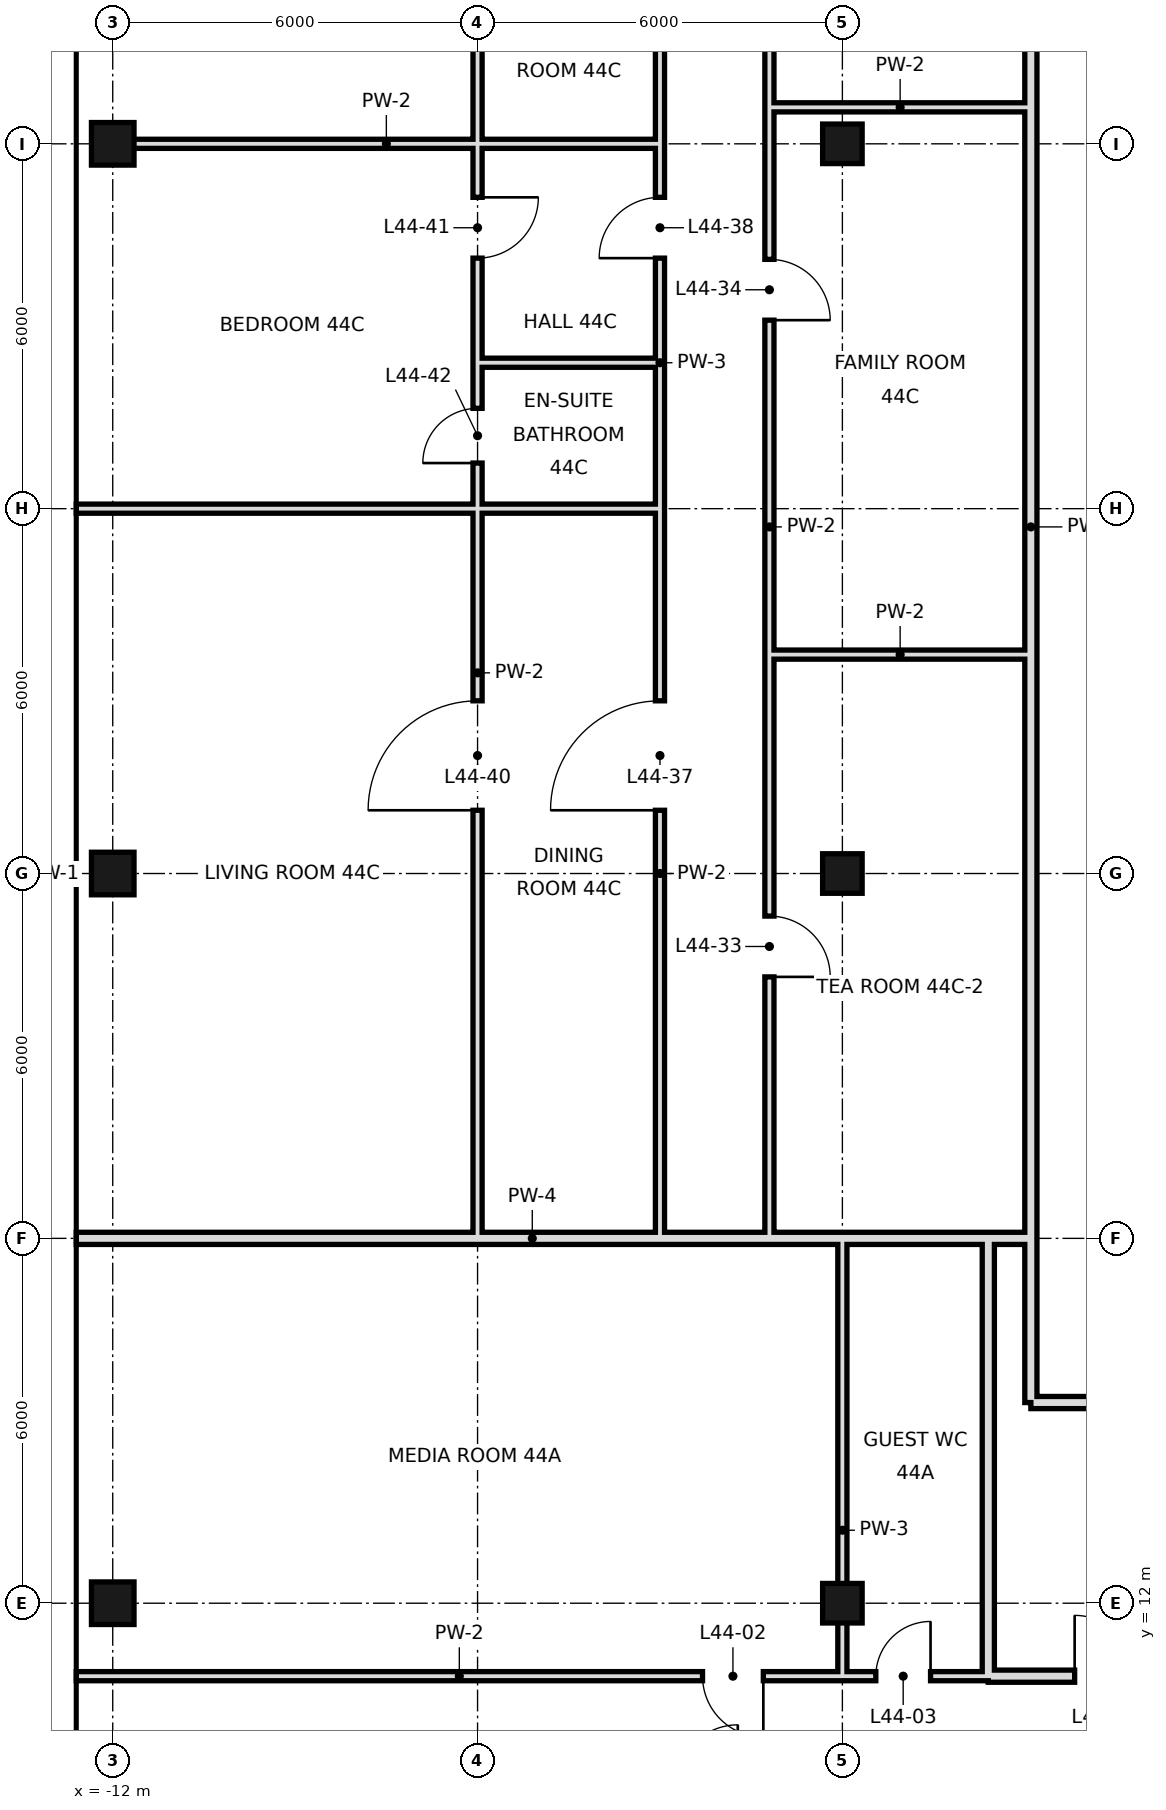
"""IFC4 building model, lengths in metres.
Left out: names, types, materials, properties, quantities, classifications, styles, units other than length and angle.
Written with IfcOpenShell. Run it as: python <this file> out.ifc"""

import sys

from ifc_helpers import new_model, si_unit, direction, frame, frame_2d, origin, origin_2d, place, context, subcontext, project, spatial, rectangle, hollow_rectangle, extrude, element, fill, save


model = new_model("IFC4")
c1 = context("Model", 3, precision=1e-05, world=origin(), true_north=direction((0.0, 1.0)))
c2 = subcontext(c1, "Body", "Model", "MODEL_VIEW")
j1 = project(units=[si_unit("LENGTHUNIT", "METRE"), si_unit("PLANEANGLEUNIT", "RADIAN")], contexts=[c1])
p1 = place(None, origin())
s1 = spatial("IfcSite", under=j1, at=p1, CompositionType="ELEMENT")
p2 = place(p1, origin())
s2 = spatial("IfcBuilding", under=s1, at=p2, CompositionType="ELEMENT")
p3 = place(p2, frame((0.0, 0.0, 192.0)))
s3 = spatial("IfcBuildingStorey", under=s2, at=p3, CompositionType="ELEMENT", Elevation=192.0)
for number, where, z_axis, x_axis in (
    (1, (-12.0, 12.0, -0.3), (0.0, 0.0, 1.0), (1.0, 0.0, 0.0)),
    (2, (-12.0, 24.0, -0.3), (0.0, 0.0, 1.0), (1.0, 0.0, 0.0)),
    (3, (-12.0, 36.0, -0.3), (0.0, 0.0, 1.0), (1.0, 0.0, 0.0)),
):
    element("IfcColumn", number, at=place(p3, frame(where, z_axis=z_axis, x_axis=x_axis)), inside=s3, PredefinedType="COLUMN", context=c2, shape_type="SweptSolid", body=[
        extrude(hollow_rectangle(XDim=0.7, YDim=0.7, WallThickness=0.036, at=origin_2d()), origin(), (0.0, 0.0, 1.0), 3.9),
    ])
for number, where, z_axis, x_axis in (
    (4, (0.0, 12.0, 0.0), (0.0, 0.0, 1.0), (1.0, 0.0, 0.0)),
    (5, (0.0, 24.0, 0.0), (0.0, 0.0, 1.0), (1.0, 0.0, 0.0)),
    (6, (0.0, 36.0, 0.0), (0.0, 0.0, 1.0), (1.0, 0.0, 0.0)),
):
    element("IfcColumn", number, at=place(p3, frame(where, z_axis=z_axis, x_axis=x_axis)), inside=s3, PredefinedType="COLUMN", context=c2, shape_type="SweptSolid", body=[
        extrude(hollow_rectangle(XDim=0.65, YDim=0.65, WallThickness=0.032, at=origin_2d()), origin(), (0.0, 0.0, 1.0), 3.6),
    ])
p4 = place(p3, frame((-1.2, 18.0, 0.0), z_axis=(0.0, 0.0, 1.0), x_axis=(0.0, 1.0, 0.0)))
e7 = element("IfcWall", 7, at=p4, inside=s3, PredefinedType="PARTITIONING", context=c2, shape_type="SweptSolid", body=[
    extrude(rectangle(XDim=23.4, YDim=0.15, at=frame_2d((11.7, 0.0))), origin(), (0.0, 0.0, 1.0), 3.42),
])
p5 = place(p4, frame((20.5, 0.0, 0.0)))
e8 = element("IfcOpeningElement", 8, at=p5, cuts=e7, PredefinedType="OPENING", context=c2, shape_type="SweptSolid", body=[
    extrude(rectangle(XDim=1.0, YDim=2.4, at=frame_2d((0.5, 1.2))), frame((0.0, 0.085, 0.0), z_axis=(0.0, -1.0, 0.0), x_axis=(1.0, 0.0, 0.0)), (0.0, 0.0, 1.0), 0.17),
])
p6 = place(p4, frame((4.3, 0.0, 0.0)))
e9 = element("IfcOpeningElement", 9, at=p6, cuts=e7, PredefinedType="OPENING", context=c2, shape_type="SweptSolid", body=[
    extrude(rectangle(XDim=1.0, YDim=2.4, at=frame_2d((0.5, 1.2))), frame((0.0, 0.085, 0.0), z_axis=(0.0, -1.0, 0.0), x_axis=(1.0, 0.0, 0.0)), (0.0, 0.0, 1.0), 0.17),
])
p7 = place(p4, frame((15.1, 0.0, 0.0)))
e10 = element("IfcOpeningElement", 10, at=p7, cuts=e7, PredefinedType="OPENING", context=c2, shape_type="SweptSolid", body=[
    extrude(rectangle(XDim=1.0, YDim=2.4, at=frame_2d((0.5, 1.2))), frame((0.0, 0.085, 0.0), z_axis=(0.0, -1.0, 0.0), x_axis=(1.0, 0.0, 0.0)), (0.0, 0.0, 1.0), 0.17),
])
p8 = place(p3, frame((-3.0, 18.0, 0.0), z_axis=(0.0, 0.0, 1.0), x_axis=(0.0, 1.0, 0.0)))
e11 = element("IfcWall", 11, at=p8, inside=s3, PredefinedType="PARTITIONING", context=c2, shape_type="SweptSolid", body=[
    extrude(rectangle(XDim=12.0, YDim=0.15, at=frame_2d((6.0, 0.0))), origin(), (0.0, 0.0, 1.0), 3.42),
])
p9 = place(p8, frame((7.04, 0.0, 0.0)))
e12 = element("IfcOpeningElement", 12, at=p9, cuts=e11, PredefinedType="OPENING", context=c2, shape_type="SweptSolid", body=[
    extrude(rectangle(XDim=1.8, YDim=2.4, at=frame_2d((0.9, 1.2))), frame((0.0, 0.085, 0.0), z_axis=(0.0, -1.0, 0.0), x_axis=(1.0, 0.0, 0.0)), (0.0, 0.0, 1.0), 0.17),
])
p10 = place(p3, frame((-3.0, 32.4, 0.0), z_axis=(0.0, 0.0, 1.0), x_axis=(0.0, 1.0, 0.0)))
e13 = element("IfcWall", 13, at=p10, inside=s3, PredefinedType="PARTITIONING", context=c2, shape_type="SweptSolid", body=[
    extrude(rectangle(XDim=16.2, YDim=0.15, at=frame_2d((8.1, 0.0))), origin(), (0.0, 0.0, 1.0), 3.42),
])
p11 = place(p10, frame((1.72, 0.0, 0.0)))
e14 = element("IfcOpeningElement", 14, at=p11, cuts=e13, PredefinedType="OPENING", context=c2, shape_type="SweptSolid", body=[
    extrude(rectangle(XDim=1.0, YDim=2.4, at=frame_2d((0.5, 1.2))), frame((0.0, 0.085, 0.0), z_axis=(0.0, -1.0, 0.0), x_axis=(1.0, 0.0, 0.0)), (0.0, 0.0, 1.0), 0.17),
])
p12 = place(p10, frame((11.2, 0.0, 0.0)))
e15 = element("IfcOpeningElement", 15, at=p12, cuts=e13, PredefinedType="OPENING", context=c2, shape_type="SweptSolid", body=[
    extrude(rectangle(XDim=1.0, YDim=2.4, at=frame_2d((0.5, 1.2))), frame((0.0, 0.085, 0.0), z_axis=(0.0, -1.0, 0.0), x_axis=(1.0, 0.0, 0.0)), (0.0, 0.0, 1.0), 0.17),
])
p13 = place(p3, frame((-3.0, 30.0, 0.0), z_axis=(0.0, 0.0, 1.0), x_axis=(0.0, 1.0, 0.0)))
e16 = element("IfcWall", 16, at=p13, inside=s3, PredefinedType="PARTITIONING", context=c2, shape_type="SweptSolid", body=[
    extrude(rectangle(XDim=2.4, YDim=0.15, at=frame_2d((1.2, 0.0))), origin(), (0.0, 0.0, 1.0), 3.42),
])
p14 = place(p3, frame((-6.0, 18.0, 0.0), z_axis=(0.0, 0.0, 1.0), x_axis=(0.0, 1.0, 0.0)))
e17 = element("IfcWall", 17, at=p14, inside=s3, PredefinedType="PARTITIONING", context=c2, shape_type="SweptSolid", body=[
    extrude(rectangle(XDim=12.0, YDim=0.15, at=frame_2d((6.0, 0.0))), origin(), (0.0, 0.0, 1.0), 3.42),
])
p15 = place(p14, frame((7.04, 0.0, 0.0)))
e18 = element("IfcOpeningElement", 18, at=p15, cuts=e17, PredefinedType="OPENING", context=c2, shape_type="SweptSolid", body=[
    extrude(rectangle(XDim=1.8, YDim=2.4, at=frame_2d((0.9, 1.2))), frame((0.0, 0.085, 0.0), z_axis=(0.0, -1.0, 0.0), x_axis=(1.0, 0.0, 0.0)), (0.0, 0.0, 1.0), 0.17),
])
p16 = place(p3, frame((-6.0, 32.4, 0.0), z_axis=(0.0, 0.0, 1.0), x_axis=(0.0, 1.0, 0.0)))
e19 = element("IfcWall", 19, at=p16, inside=s3, PredefinedType="PARTITIONING", context=c2, shape_type="SweptSolid", body=[
    extrude(rectangle(XDim=15.6, YDim=0.15, at=frame_2d((7.8, 0.0))), origin(), (0.0, 0.0, 1.0), 3.42),
])
p17 = place(p16, frame((1.72, 0.0, 0.0)))
e20 = element("IfcOpeningElement", 20, at=p17, cuts=e19, PredefinedType="OPENING", context=c2, shape_type="SweptSolid", body=[
    extrude(rectangle(XDim=1.0, YDim=2.4, at=frame_2d((0.5, 1.2))), frame((0.0, 0.085, 0.0), z_axis=(0.0, -1.0, 0.0), x_axis=(1.0, 0.0, 0.0)), (0.0, 0.0, 1.0), 0.17),
])
p18 = place(p16, frame((11.2, 0.0, 0.0)))
e21 = element("IfcOpeningElement", 21, at=p18, cuts=e19, PredefinedType="OPENING", context=c2, shape_type="SweptSolid", body=[
    extrude(rectangle(XDim=1.0, YDim=2.4, at=frame_2d((0.5, 1.2))), frame((0.0, 0.085, 0.0), z_axis=(0.0, -1.0, 0.0), x_axis=(1.0, 0.0, 0.0)), (0.0, 0.0, 1.0), 0.17),
])
p19 = place(p3, frame((-6.0, 30.0, 0.0), z_axis=(0.0, 0.0, 1.0), x_axis=(0.0, 1.0, 0.0)))
e22 = element("IfcWall", 22, at=p19, inside=s3, PredefinedType="PARTITIONING", context=c2, shape_type="SweptSolid", body=[
    extrude(rectangle(XDim=2.4, YDim=0.15, at=frame_2d((1.2, 0.0))), origin(), (0.0, 0.0, 1.0), 3.42),
])
p20 = place(p19, frame((0.75, 0.0, 0.0)))
e23 = element("IfcOpeningElement", 23, at=p20, cuts=e22, PredefinedType="OPENING", context=c2, shape_type="SweptSolid", body=[
    extrude(rectangle(XDim=0.9, YDim=2.4, at=frame_2d((0.45, 1.2))), frame((0.0, 0.085, 0.0), z_axis=(0.0, -1.0, 0.0), x_axis=(1.0, 0.0, 0.0)), (0.0, 0.0, 1.0), 0.17),
])
p21 = place(p3, frame((0.0, 10.8, 0.0), z_axis=(0.0, 0.0, 1.0), x_axis=(0.0, 1.0, 0.0)))
e24 = element("IfcWall", 24, at=p21, inside=s3, PredefinedType="PARTITIONING", context=c2, shape_type="SweptSolid", body=[
    extrude(rectangle(XDim=7.2, YDim=0.15, at=frame_2d((3.6, 0.0))), origin(), (0.0, 0.0, 1.0), 2.72),
])
p22 = place(p3, frame((2.4, 10.8, 0.0), z_axis=(0.0, 0.0, 1.0), x_axis=(0.0, 1.0, 0.0)))
e25 = element("IfcWall", 25, at=p22, inside=s3, PredefinedType="SOLIDWALL", context=c2, shape_type="SweptSolid", body=[
    extrude(rectangle(XDim=7.2, YDim=0.2, at=frame_2d((3.6, 0.0))), origin(), (0.0, 0.0, 1.0), 2.72),
])
p23 = place(p3, frame((3.1, 18.0, 0.0), z_axis=(0.0, 0.0, 1.0), x_axis=(0.0, 1.0, 0.0)))
e26 = element("IfcWall", 26, at=p23, inside=s3, PredefinedType="SOLIDWALL", context=c2, shape_type="SweptSolid", body=[
    extrude(rectangle(XDim=23.4, YDim=0.2, at=frame_2d((11.7, 0.0))), origin(), (0.0, 0.0, 1.0), 2.97),
])
p24 = place(p23, frame((20.4, 0.0, 0.0)))
e27 = element("IfcOpeningElement", 27, at=p24, cuts=e26, PredefinedType="OPENING", context=c2, shape_type="SweptSolid", body=[
    extrude(rectangle(XDim=1.2, YDim=2.4, at=frame_2d((0.6, 1.2))), frame((0.0, 0.11, 0.0), z_axis=(0.0, -1.0, 0.0), x_axis=(1.0, 0.0, 0.0)), (0.0, 0.0, 1.0), 0.22),
])
p25 = place(p3, frame((3.1, 15.3, 0.0), z_axis=(0.0, 0.0, 1.0), x_axis=(0.0, 1.0, 0.0)))
e28 = element("IfcWall", 28, at=p25, inside=s3, PredefinedType="SOLIDWALL", context=c2, shape_type="SweptSolid", body=[
    extrude(rectangle(XDim=2.7, YDim=0.2, at=frame_2d((1.35, 0.0))), origin(), (0.0, 0.0, 1.0), 2.97),
])
p26 = place(p3, frame((2.4, 10.8, 0.0), z_axis=(0.0, 0.0, 1.0), x_axis=(1.0, 0.0, 0.0)))
e29 = element("IfcWall", 29, at=p26, inside=s3, PredefinedType="SOLIDWALL", context=c2, shape_type="SweptSolid", body=[
    extrude(rectangle(XDim=5.4, YDim=0.2, at=frame_2d((2.7, 0.0))), origin(), (0.0, 0.0, 1.0), 2.72),
])
p27 = place(p26, frame((1.42, 0.0, 0.0)))
e30 = element("IfcOpeningElement", 30, at=p27, cuts=e29, PredefinedType="OPENING", context=c2, shape_type="SweptSolid", body=[
    extrude(rectangle(XDim=1.0, YDim=2.4, at=frame_2d((0.5, 1.2))), frame((0.0, 0.11, 0.0), z_axis=(0.0, -1.0, 0.0), x_axis=(1.0, 0.0, 0.0)), (0.0, 0.0, 1.0), 0.22),
])
p28 = place(p3, frame((-12.6, 10.8, 0.0), z_axis=(0.0, 0.0, 1.0), x_axis=(1.0, 0.0, 0.0)))
e31 = element("IfcWall", 31, at=p28, inside=s3, PredefinedType="PARTITIONING", context=c2, shape_type="SweptSolid", body=[
    extrude(rectangle(XDim=12.6, YDim=0.15, at=frame_2d((6.3, 0.0))), origin(), (0.0, 0.0, 1.0), 3.42),
])
p29 = place(p28, frame((10.3, 0.0, 0.0)))
e32 = element("IfcOpeningElement", 32, at=p29, cuts=e31, PredefinedType="OPENING", context=c2, shape_type="SweptSolid", body=[
    extrude(rectangle(XDim=1.0, YDim=2.4, at=frame_2d((0.5, 1.2))), frame((0.0, 0.085, 0.0), z_axis=(0.0, -1.0, 0.0), x_axis=(1.0, 0.0, 0.0)), (0.0, 0.0, 1.0), 0.17),
])
p30 = place(p3, frame((0.0, 10.8, 0.0), z_axis=(0.0, 0.0, 1.0), x_axis=(1.0, 0.0, 0.0)))
e33 = element("IfcWall", 33, at=p30, inside=s3, PredefinedType="PARTITIONING", context=c2, shape_type="SweptSolid", body=[
    extrude(rectangle(XDim=2.4, YDim=0.15, at=frame_2d((1.2, 0.0))), origin(), (0.0, 0.0, 1.0), 3.42),
])
p31 = place(p30, frame((0.55, 0.0, 0.0)))
e34 = element("IfcOpeningElement", 34, at=p31, cuts=e33, PredefinedType="OPENING", context=c2, shape_type="SweptSolid", body=[
    extrude(rectangle(XDim=0.9, YDim=2.4, at=frame_2d((0.45, 1.2))), frame((0.0, 0.085, 0.0), z_axis=(0.0, -1.0, 0.0), x_axis=(1.0, 0.0, 0.0)), (0.0, 0.0, 1.0), 0.17),
])
p32 = place(p3, frame((3.1, 15.3, 0.0), z_axis=(0.0, 0.0, 1.0), x_axis=(1.0, 0.0, 0.0)))
e35 = element("IfcWall", 35, at=p32, inside=s3, PredefinedType="SOLIDWALL", context=c2, shape_type="SweptSolid", body=[
    extrude(rectangle(XDim=4.7, YDim=0.2, at=frame_2d((2.35, 0.0))), origin(), (0.0, 0.0, 1.0), 2.72),
])
p33 = place(p3, frame((2.4, 18.0, 0.0), z_axis=(0.0, 0.0, 1.0), x_axis=(1.0, 0.0, 0.0)))
e36 = element("IfcWall", 36, at=p33, inside=s3, PredefinedType="SOLIDWALL", context=c2, shape_type="SweptSolid", body=[
    extrude(rectangle(XDim=0.7, YDim=0.2, at=frame_2d((0.35, 0.0))), origin(), (0.0, 0.0, 1.0), 2.97),
])
p34 = place(p3, frame((-12.6, 18.0, 0.0), z_axis=(0.0, 0.0, 1.0), x_axis=(1.0, 0.0, 0.0)))
e37 = element("IfcWall", 37, at=p34, inside=s3, PredefinedType="SOLIDWALL", context=c2, shape_type="SweptSolid", body=[
    extrude(rectangle(XDim=15.0, YDim=0.2, at=frame_2d((7.5, 0.0))), origin(), (0.0, 0.0, 1.0), 2.72),
])
p35 = place(p3, frame((-1.2, 27.6, 0.0), z_axis=(0.0, 0.0, 1.0), x_axis=(1.0, 0.0, 0.0)))
e38 = element("IfcWall", 38, at=p35, inside=s3, PredefinedType="PARTITIONING", context=c2, shape_type="SweptSolid", body=[
    extrude(rectangle(XDim=4.3, YDim=0.15, at=frame_2d((2.15, 0.0))), origin(), (0.0, 0.0, 1.0), 3.42),
])
p36 = place(p3, frame((-12.6, 30.0, 0.0), z_axis=(0.0, 0.0, 1.0), x_axis=(1.0, 0.0, 0.0)))
e39 = element("IfcWall", 39, at=p36, inside=s3, PredefinedType="PARTITIONING", context=c2, shape_type="SweptSolid", body=[
    extrude(rectangle(XDim=6.6, YDim=0.15, at=frame_2d((3.3, 0.0))), origin(), (0.0, 0.0, 1.0), 2.72),
])
p37 = place(p3, frame((-6.0, 30.0, 0.0), z_axis=(0.0, 0.0, 1.0), x_axis=(1.0, 0.0, 0.0)))
e40 = element("IfcWall", 40, at=p37, inside=s3, PredefinedType="PARTITIONING", context=c2, shape_type="SweptSolid", body=[
    extrude(rectangle(XDim=3.0, YDim=0.15, at=frame_2d((1.5, 0.0))), origin(), (0.0, 0.0, 1.0), 2.72),
])
p38 = place(p3, frame((-6.0, 32.4, 0.0), z_axis=(0.0, 0.0, 1.0), x_axis=(1.0, 0.0, 0.0)))
e41 = element("IfcWall", 41, at=p38, inside=s3, PredefinedType="PARTITIONING", context=c2, shape_type="SweptSolid", body=[
    extrude(rectangle(XDim=3.0, YDim=0.15, at=frame_2d((1.5, 0.0))), origin(), (0.0, 0.0, 1.0), 3.42),
])
p39 = place(p3, frame((-12.0, 36.0, 0.0), z_axis=(0.0, 0.0, 1.0), x_axis=(1.0, 0.0, 0.0)))
e42 = element("IfcWall", 42, at=p39, inside=s3, PredefinedType="PARTITIONING", context=c2, shape_type="SweptSolid", body=[
    extrude(rectangle(XDim=9.0, YDim=0.15, at=frame_2d((4.5, 0.0))), origin(), (0.0, 0.0, 1.0), 2.72),
])
p40 = place(p3, frame((-1.2, 36.6, 0.0), z_axis=(0.0, 0.0, 1.0), x_axis=(1.0, 0.0, 0.0)))
e43 = element("IfcWall", 43, at=p40, inside=s3, PredefinedType="PARTITIONING", context=c2, shape_type="SweptSolid", body=[
    extrude(rectangle(XDim=4.3, YDim=0.15, at=frame_2d((2.15, 0.0))), origin(), (0.0, 0.0, 1.0), 3.42),
])
p41 = place(p29, origin())
e44 = element("IfcDoor", 44, at=p41, inside=s3, OperationType="SINGLE_SWING_RIGHT", PredefinedType="DOOR", context=c2, shape_type="SweptSolid", body=[
    extrude(rectangle(XDim=1.0, YDim=2.4, at=frame_2d((0.5, 1.2))), frame((0.0, 0.025, 0.0), z_axis=(0.0, -1.0, 0.0), x_axis=(1.0, 0.0, 0.0)), (0.0, 0.0, 1.0), 0.05),
])
fill(e32, e44)
p42 = place(p31, frame((0.9, 0.0, 0.0), z_axis=(0.0, 0.0, 1.0), x_axis=(-1.0, 0.0, 0.0)))
e45 = element("IfcDoor", 45, at=p42, inside=s3, OperationType="SINGLE_SWING_LEFT", PredefinedType="DOOR", context=c2, shape_type="SweptSolid", body=[
    extrude(rectangle(XDim=0.9, YDim=2.4, at=frame_2d((0.45, 1.2))), frame((0.0, 0.025, 0.0), z_axis=(0.0, -1.0, 0.0), x_axis=(1.0, 0.0, 0.0)), (0.0, 0.0, 1.0), 0.05),
])
fill(e34, e45)
p43 = place(p27, origin())
e46 = element("IfcDoor", 46, at=p43, inside=s3, OperationType="SINGLE_SWING_LEFT", PredefinedType="DOOR", context=c2, shape_type="SweptSolid", body=[
    extrude(rectangle(XDim=1.0, YDim=2.4, at=frame_2d((0.5, 1.2))), frame((0.0, 0.025, 0.0), z_axis=(0.0, -1.0, 0.0), x_axis=(1.0, 0.0, 0.0)), (0.0, 0.0, 1.0), 0.05),
])
fill(e30, e46)
p44 = place(p6, frame((1.0, 0.0, 0.0), z_axis=(0.0, 0.0, 1.0), x_axis=(-1.0, 0.0, 0.0)))
e47 = element("IfcDoor", 47, at=p44, inside=s3, OperationType="SINGLE_SWING_RIGHT", PredefinedType="DOOR", context=c2, shape_type="SweptSolid", body=[
    extrude(rectangle(XDim=1.0, YDim=2.4, at=frame_2d((0.5, 1.2))), frame((0.0, 0.025, 0.0), z_axis=(0.0, -1.0, 0.0), x_axis=(1.0, 0.0, 0.0)), (0.0, 0.0, 1.0), 0.05),
])
fill(e9, e47)
p45 = place(p7, frame((1.0, 0.0, 0.0), z_axis=(0.0, 0.0, 1.0), x_axis=(-1.0, 0.0, 0.0)))
e48 = element("IfcDoor", 48, at=p45, inside=s3, OperationType="SINGLE_SWING_RIGHT", PredefinedType="DOOR", context=c2, shape_type="SweptSolid", body=[
    extrude(rectangle(XDim=1.0, YDim=2.4, at=frame_2d((0.5, 1.2))), frame((0.0, 0.025, 0.0), z_axis=(0.0, -1.0, 0.0), x_axis=(1.0, 0.0, 0.0)), (0.0, 0.0, 1.0), 0.05),
])
fill(e10, e48)
p46 = place(p9, origin())
e49 = element("IfcDoor", 49, at=p46, inside=s3, OperationType="SINGLE_SWING_LEFT", PredefinedType="DOOR", context=c2, shape_type="SweptSolid", body=[
    extrude(rectangle(XDim=1.8, YDim=2.4, at=frame_2d((0.9, 1.2))), frame((0.0, 0.025, 0.0), z_axis=(0.0, -1.0, 0.0), x_axis=(1.0, 0.0, 0.0)), (0.0, 0.0, 1.0), 0.05),
])
fill(e12, e49)
p47 = place(p11, origin())
e50 = element("IfcDoor", 50, at=p47, inside=s3, OperationType="SINGLE_SWING_LEFT", PredefinedType="DOOR", context=c2, shape_type="SweptSolid", body=[
    extrude(rectangle(XDim=1.0, YDim=2.4, at=frame_2d((0.5, 1.2))), frame((0.0, 0.025, 0.0), z_axis=(0.0, -1.0, 0.0), x_axis=(1.0, 0.0, 0.0)), (0.0, 0.0, 1.0), 0.05),
])
fill(e14, e50)
p48 = place(p15, origin())
e51 = element("IfcDoor", 51, at=p48, inside=s3, OperationType="SINGLE_SWING_LEFT", PredefinedType="DOOR", context=c2, shape_type="SweptSolid", body=[
    extrude(rectangle(XDim=1.8, YDim=2.4, at=frame_2d((0.9, 1.2))), frame((0.0, 0.025, 0.0), z_axis=(0.0, -1.0, 0.0), x_axis=(1.0, 0.0, 0.0)), (0.0, 0.0, 1.0), 0.05),
])
fill(e18, e51)
p49 = place(p17, origin())
e52 = element("IfcDoor", 52, at=p49, inside=s3, OperationType="SINGLE_SWING_RIGHT", PredefinedType="DOOR", context=c2, shape_type="SweptSolid", body=[
    extrude(rectangle(XDim=1.0, YDim=2.4, at=frame_2d((0.5, 1.2))), frame((0.0, 0.025, 0.0), z_axis=(0.0, -1.0, 0.0), x_axis=(1.0, 0.0, 0.0)), (0.0, 0.0, 1.0), 0.05),
])
fill(e20, e52)
p50 = place(p20, origin())
e53 = element("IfcDoor", 53, at=p50, inside=s3, OperationType="SINGLE_SWING_LEFT", PredefinedType="DOOR", context=c2, shape_type="SweptSolid", body=[
    extrude(rectangle(XDim=0.9, YDim=2.4, at=frame_2d((0.45, 1.2))), frame((0.0, 0.025, 0.0), z_axis=(0.0, -1.0, 0.0), x_axis=(1.0, 0.0, 0.0)), (0.0, 0.0, 1.0), 0.05),
])
fill(e23, e53)
save(model, sys.argv[1])
